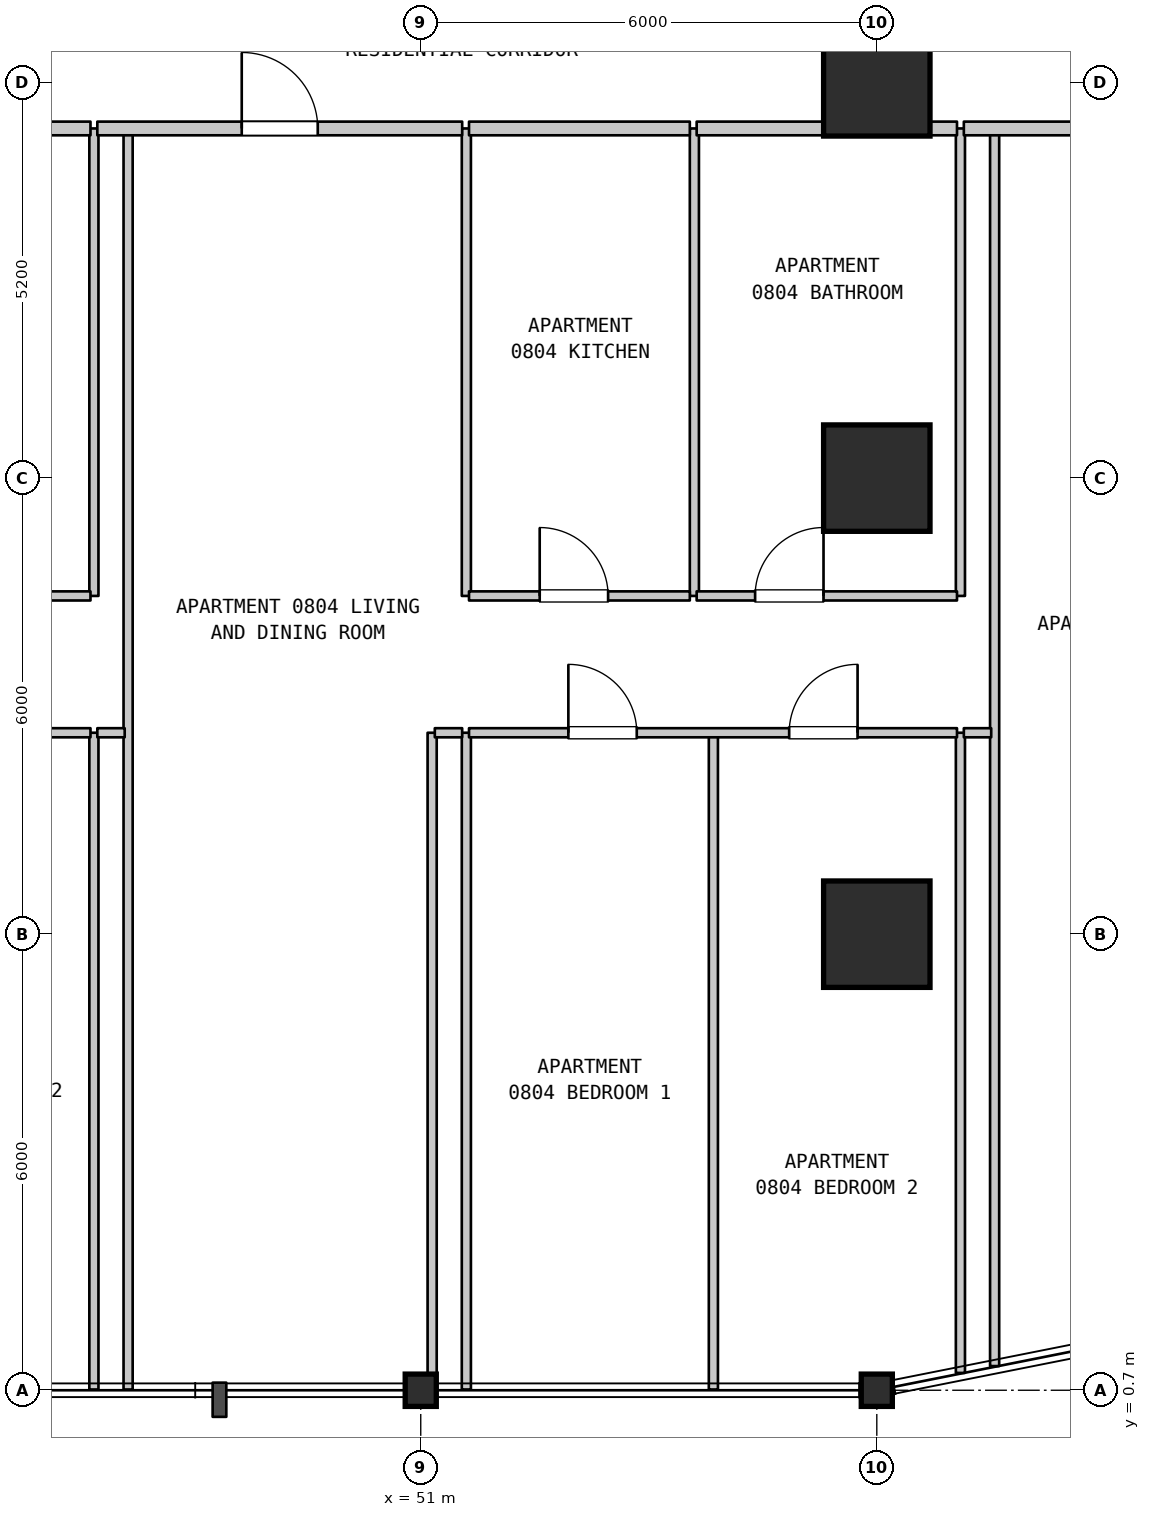
"""IFC4 building model, lengths in metres.
Left out: names, types, materials, properties, quantities, classifications, styles, units other than length and angle.
Written with IfcOpenShell. Run it as: python <this file> out.ifc"""

import sys

from ifc_helpers import new_model, si_unit, direction, frame, frame_2d, origin, origin_2d, place, context, subcontext, project, spatial, rectangle, i_section, extrude, element, fill, save


model = new_model("IFC4")
c1 = context("Model", 3, precision=1e-05, world=origin(), true_north=direction((0.0, 1.0)))
c2 = subcontext(c1, "Body", "Model", "MODEL_VIEW")
j1 = project(units=[si_unit("LENGTHUNIT", "METRE"), si_unit("PLANEANGLEUNIT", "RADIAN")], contexts=[c1])
p1 = place(None, origin())
s1 = spatial("IfcSite", under=j1, at=p1, CompositionType="ELEMENT")
p2 = place(p1, origin())
s2 = spatial("IfcBuilding", under=s1, at=p2, CompositionType="ELEMENT")
p3 = place(p2, frame((0.0, 0.0, 38.8)))
s3 = spatial("IfcBuildingStorey", under=s2, at=p3, CompositionType="ELEMENT", Elevation=38.8)
for number, where, z_axis, x_axis in (
    (1, (51.0, 0.7, 0.0), (0.0, 0.0, 1.0), (1.0, 0.0, 0.0)),
    (2, (57.0, 0.7, 0.0), (0.0, 0.0, 1.0), (1.0, 0.0, 0.0)),
):
    element("IfcColumn", number, at=place(p3, frame(where, z_axis=z_axis, x_axis=x_axis)), inside=s3, PredefinedType="COLUMN", context=c2, shape_type="SweptSolid", body=[
        extrude(i_section(OverallWidth=0.409, OverallDepth=0.425, WebThickness=0.032, FlangeThickness=0.052, FilletRadius=0.015, at=origin_2d()), origin(), (0.0, 0.0, 1.0), 3.7),
    ])
for number, where, z_axis, x_axis in (
    (3, (57.0, 6.7, 0.0), (0.0, 0.0, 1.0), (1.0, 0.0, 0.0)),
    (4, (57.0, 12.7, 0.0), (0.0, 0.0, 1.0), (1.0, 0.0, 0.0)),
    (5, (57.0, 17.9, 0.0), (0.0, 0.0, 1.0), (1.0, 0.0, 0.0)),
):
    element("IfcColumn", number, at=place(p3, frame(where, z_axis=z_axis, x_axis=x_axis)), inside=s3, PredefinedType="COLUMN", context=c2, shape_type="SweptSolid", body=[
        extrude(rectangle(XDim=1.4, YDim=1.4, at=origin_2d()), origin(), (0.0, 0.0, 1.0), 3.7),
    ])
p4 = place(p3, frame((46.7, 0.71, 0.0), z_axis=(0.0, 0.0, 1.0), x_axis=(0.0, 1.0, 0.0)))
e6 = element("IfcWall", 6, at=p4, inside=s3, PredefinedType="PARTITIONING", context=c2, shape_type="SweptSolid", body=[
    extrude(rectangle(XDim=8.64, YDim=0.12, at=frame_2d((4.32, 0.0))), origin(), (0.0, 0.0, 1.0), 3.385),
])
p5 = place(p3, frame((46.7, 11.15, 0.0), z_axis=(0.0, 0.0, 1.0), x_axis=(0.0, 1.0, 0.0)))
e7 = element("IfcWall", 7, at=p5, inside=s3, PredefinedType="PARTITIONING", context=c2, shape_type="SweptSolid", body=[
    extrude(rectangle(XDim=6.15, YDim=0.12, at=frame_2d((3.075, 0.0))), origin(), (0.0, 0.0, 1.0), 3.385),
])
p6 = place(p3, frame((47.15, 0.71, 0.0), z_axis=(0.0, 0.0, 1.0), x_axis=(0.0, 1.0, 0.0)))
e8 = element("IfcWall", 8, at=p6, inside=s3, PredefinedType="PARTITIONING", context=c2, shape_type="SweptSolid", body=[
    extrude(rectangle(XDim=16.59, YDim=0.12, at=frame_2d((8.295, 0.0))), origin(), (0.0, 0.0, 1.0), 3.385),
])
for number, where, z_axis, x_axis in (
    (9, (51.15, 0.71, 0.0), (0.0, 0.0, 1.0), (0.0, 1.0, 0.0)),
    (10, (51.6, 0.71, 0.0), (0.0, 0.0, 1.0), (0.0, 1.0, 0.0)),
):
    element("IfcWall", number, at=place(p3, frame(where, z_axis=z_axis, x_axis=x_axis)), inside=s3, PredefinedType="PARTITIONING", context=c2, shape_type="SweptSolid", body=[
        extrude(rectangle(XDim=8.64, YDim=0.12, at=frame_2d((4.32, 0.0))), origin(), (0.0, 0.0, 1.0), 3.385),
    ])
for number, where, z_axis, x_axis in (
    (11, (51.6, 11.15, 0.0), (0.0, 0.0, 1.0), (0.0, 1.0, 0.0)),
    (12, (54.6, 11.15, 0.0), (0.0, 0.0, 1.0), (0.0, 1.0, 0.0)),
):
    element("IfcWall", number, at=place(p3, frame(where, z_axis=z_axis, x_axis=x_axis)), inside=s3, PredefinedType="PARTITIONING", context=c2, shape_type="SweptSolid", body=[
        extrude(rectangle(XDim=6.15, YDim=0.12, at=frame_2d((3.075, 0.0))), origin(), (0.0, 0.0, 1.0), 3.385),
    ])
p7 = place(p3, frame((54.85, 0.71, 0.0), z_axis=(0.0, 0.0, 1.0), x_axis=(0.0, 1.0, 0.0)))
e13 = element("IfcWall", 13, at=p7, inside=s3, PredefinedType="PARTITIONING", context=c2, shape_type="SweptSolid", body=[
    extrude(rectangle(XDim=8.64, YDim=0.12, at=frame_2d((4.32, 0.0))), origin(), (0.0, 0.0, 1.0), 3.385),
])
p8 = place(p3, frame((58.1, 0.928, 0.0), z_axis=(0.0, 0.0, 1.0), x_axis=(0.0, 1.0, 0.0)))
e14 = element("IfcWall", 14, at=p8, inside=s3, PredefinedType="PARTITIONING", context=c2, shape_type="SweptSolid", body=[
    extrude(rectangle(XDim=8.422, YDim=0.12, at=frame_2d((4.211, 0.0))), origin(), (0.0, 0.0, 1.0), 3.385),
])
p9 = place(p3, frame((58.1, 11.15, 0.0), z_axis=(0.0, 0.0, 1.0), x_axis=(0.0, 1.0, 0.0)))
e15 = element("IfcWall", 15, at=p9, inside=s3, PredefinedType="PARTITIONING", context=c2, shape_type="SweptSolid", body=[
    extrude(rectangle(XDim=6.15, YDim=0.12, at=frame_2d((3.075, 0.0))), origin(), (0.0, 0.0, 1.0), 3.385),
])
p10 = place(p3, frame((58.55, 1.018, 0.0), z_axis=(0.0, 0.0, 1.0), x_axis=(0.0, 1.0, 0.0)))
e16 = element("IfcWall", 16, at=p10, inside=s3, PredefinedType="PARTITIONING", context=c2, shape_type="SweptSolid", body=[
    extrude(rectangle(XDim=16.282, YDim=0.12, at=frame_2d((8.141, 0.0))), origin(), (0.0, 0.0, 1.0), 3.385),
])
p11 = place(p3, frame((40.805, 9.35, 0.0), z_axis=(0.0, 0.0, 1.0), x_axis=(1.0, 0.0, 0.0)))
e17 = element("IfcWall", 17, at=p11, inside=s3, PredefinedType="PARTITIONING", context=c2, shape_type="SweptSolid", body=[
    extrude(rectangle(XDim=5.85, YDim=0.12, at=frame_2d((2.925, 0.0))), origin(), (0.0, 0.0, 1.0), 3.385),
])
p12 = place(p11, frame((1.165, 0.0, 0.0)))
e18 = element("IfcOpeningElement", 18, at=p12, cuts=e17, PredefinedType="OPENING", context=c2, shape_type="SweptSolid", body=[
    extrude(rectangle(XDim=0.9, YDim=2.15, at=frame_2d((0.45, 1.075))), frame((0.0, 0.07, 0.0), z_axis=(0.0, -1.0, 0.0), x_axis=(1.0, 0.0, 0.0)), (0.0, 0.0, 1.0), 0.14),
])
p13 = place(p11, frame((3.785, 0.0, 0.0)))
e19 = element("IfcOpeningElement", 19, at=p13, cuts=e17, PredefinedType="OPENING", context=c2, shape_type="SweptSolid", body=[
    extrude(rectangle(XDim=0.9, YDim=2.15, at=frame_2d((0.45, 1.075))), frame((0.0, 0.07, 0.0), z_axis=(0.0, -1.0, 0.0), x_axis=(1.0, 0.0, 0.0)), (0.0, 0.0, 1.0), 0.14),
])
for number, where, z_axis, x_axis in (
    (20, (46.745, 9.35, 0.0), (0.0, 0.0, 1.0), (1.0, 0.0, 0.0)),
    (21, (51.185, 9.35, 0.0), (0.0, 0.0, 1.0), (1.0, 0.0, 0.0)),
):
    element("IfcWall", number, at=place(p3, frame(where, z_axis=z_axis, x_axis=x_axis)), inside=s3, PredefinedType="PARTITIONING", context=c2, shape_type="SweptSolid", body=[
        extrude(rectangle(XDim=0.36, YDim=0.12, at=frame_2d((0.18, 0.0))), origin(), (0.0, 0.0, 1.0), 3.385),
    ])
p14 = place(p3, frame((51.635, 9.35, 0.0), z_axis=(0.0, 0.0, 1.0), x_axis=(1.0, 0.0, 0.0)))
e22 = element("IfcWall", 22, at=p14, inside=s3, PredefinedType="PARTITIONING", context=c2, shape_type="SweptSolid", body=[
    extrude(rectangle(XDim=6.42, YDim=0.12, at=frame_2d((3.21, 0.0))), origin(), (0.0, 0.0, 1.0), 3.385),
])
p15 = place(p14, frame((1.307, 0.0, 0.0)))
e23 = element("IfcOpeningElement", 23, at=p15, cuts=e22, PredefinedType="OPENING", context=c2, shape_type="SweptSolid", body=[
    extrude(rectangle(XDim=0.9, YDim=2.15, at=frame_2d((0.45, 1.075))), frame((0.0, 0.07, 0.0), z_axis=(0.0, -1.0, 0.0), x_axis=(1.0, 0.0, 0.0)), (0.0, 0.0, 1.0), 0.14),
])
p16 = place(p14, frame((4.212, 0.0, 0.0)))
e24 = element("IfcOpeningElement", 24, at=p16, cuts=e22, PredefinedType="OPENING", context=c2, shape_type="SweptSolid", body=[
    extrude(rectangle(XDim=0.9, YDim=2.15, at=frame_2d((0.45, 1.075))), frame((0.0, 0.07, 0.0), z_axis=(0.0, -1.0, 0.0), x_axis=(1.0, 0.0, 0.0)), (0.0, 0.0, 1.0), 0.14),
])
p17 = place(p3, frame((58.145, 9.35, 0.0), z_axis=(0.0, 0.0, 1.0), x_axis=(1.0, 0.0, 0.0)))
e25 = element("IfcWall", 25, at=p17, inside=s3, PredefinedType="PARTITIONING", context=c2, shape_type="SweptSolid", body=[
    extrude(rectangle(XDim=0.36, YDim=0.12, at=frame_2d((0.18, 0.0))), origin(), (0.0, 0.0, 1.0), 3.385),
])
p18 = place(p3, frame((43.537, 11.15, 0.0), z_axis=(0.0, 0.0, 1.0), x_axis=(1.0, 0.0, 0.0)))
e26 = element("IfcWall", 26, at=p18, inside=s3, PredefinedType="PARTITIONING", context=c2, shape_type="SweptSolid", body=[
    extrude(rectangle(XDim=3.118, YDim=0.12, at=frame_2d((1.559, 0.0))), origin(), (0.0, 0.0, 1.0), 3.385),
])
p19 = place(p18, frame((1.109, 0.0, 0.0)))
e27 = element("IfcOpeningElement", 27, at=p19, cuts=e26, PredefinedType="OPENING", context=c2, shape_type="SweptSolid", body=[
    extrude(rectangle(XDim=0.9, YDim=2.1, at=frame_2d((0.45, 1.05))), frame((0.0, 0.07, 0.0), z_axis=(0.0, -1.0, 0.0), x_axis=(1.0, 0.0, 0.0)), (0.0, 0.0, 1.0), 0.14),
])
p20 = place(p3, frame((51.635, 11.15, 0.0), z_axis=(0.0, 0.0, 1.0), x_axis=(1.0, 0.0, 0.0)))
e28 = element("IfcWall", 28, at=p20, inside=s3, PredefinedType="PARTITIONING", context=c2, shape_type="SweptSolid", body=[
    extrude(rectangle(XDim=2.905, YDim=0.12, at=frame_2d((1.453, 0.0))), origin(), (0.0, 0.0, 1.0), 3.385),
])
p21 = place(p20, frame((0.93, 0.0, 0.0)))
e29 = element("IfcOpeningElement", 29, at=p21, cuts=e28, PredefinedType="OPENING", context=c2, shape_type="SweptSolid", body=[
    extrude(rectangle(XDim=0.9, YDim=2.15, at=frame_2d((0.45, 1.075))), frame((0.0, 0.07, 0.0), z_axis=(0.0, -1.0, 0.0), x_axis=(1.0, 0.0, 0.0)), (0.0, 0.0, 1.0), 0.14),
])
p22 = place(p3, frame((54.63, 11.15, 0.0), z_axis=(0.0, 0.0, 1.0), x_axis=(1.0, 0.0, 0.0)))
e30 = element("IfcWall", 30, at=p22, inside=s3, PredefinedType="PARTITIONING", context=c2, shape_type="SweptSolid", body=[
    extrude(rectangle(XDim=3.425, YDim=0.12, at=frame_2d((1.712, 0.0))), origin(), (0.0, 0.0, 1.0), 3.385),
])
p23 = place(p22, frame((0.769, 0.0, 0.0)))
e31 = element("IfcOpeningElement", 31, at=p23, cuts=e30, PredefinedType="OPENING", context=c2, shape_type="SweptSolid", body=[
    extrude(rectangle(XDim=0.9, YDim=2.1, at=frame_2d((0.45, 1.05))), frame((0.0, 0.07, 0.0), z_axis=(0.0, -1.0, 0.0), x_axis=(1.0, 0.0, 0.0)), (0.0, 0.0, 1.0), 0.14),
])
p24 = place(p3, frame((43.537, 17.3, 0.0), z_axis=(0.0, 0.0, 1.0), x_axis=(1.0, 0.0, 0.0)))
e32 = element("IfcWall", 32, at=p24, inside=s3, PredefinedType="STANDARD", context=c2, shape_type="SweptSolid", body=[
    extrude(rectangle(XDim=3.118, YDim=0.18, at=frame_2d((1.559, 0.0))), origin(), (0.0, 0.0, 1.0), 3.385),
])
p25 = place(p3, frame((46.745, 17.3, 0.0), z_axis=(0.0, 0.0, 1.0), x_axis=(1.0, 0.0, 0.0)))
e33 = element("IfcWall", 33, at=p25, inside=s3, PredefinedType="STANDARD", context=c2, shape_type="SweptSolid", body=[
    extrude(rectangle(XDim=4.8, YDim=0.18, at=frame_2d((2.4, 0.0))), origin(), (0.0, 0.0, 1.0), 3.385),
])
p26 = place(p25, frame((1.9, 0.0, 0.0)))
e34 = element("IfcOpeningElement", 34, at=p26, cuts=e33, PredefinedType="OPENING", context=c2, shape_type="SweptSolid", body=[
    extrude(rectangle(XDim=1.0, YDim=2.15, at=frame_2d((0.5, 1.075))), frame((0.0, 0.1, 0.0), z_axis=(0.0, -1.0, 0.0), x_axis=(1.0, 0.0, 0.0)), (0.0, 0.0, 1.0), 0.2),
])
p27 = place(p3, frame((51.635, 17.3, 0.0), z_axis=(0.0, 0.0, 1.0), x_axis=(1.0, 0.0, 0.0)))
e35 = element("IfcWall", 35, at=p27, inside=s3, PredefinedType="STANDARD", context=c2, shape_type="SweptSolid", body=[
    extrude(rectangle(XDim=2.905, YDim=0.18, at=frame_2d((1.453, 0.0))), origin(), (0.0, 0.0, 1.0), 3.385),
])
p28 = place(p3, frame((54.63, 17.3, 0.0), z_axis=(0.0, 0.0, 1.0), x_axis=(1.0, 0.0, 0.0)))
e36 = element("IfcWall", 36, at=p28, inside=s3, PredefinedType="STANDARD", context=c2, shape_type="SweptSolid", body=[
    extrude(rectangle(XDim=3.425, YDim=0.18, at=frame_2d((1.712, 0.0))), origin(), (0.0, 0.0, 1.0), 3.385),
])
p29 = place(p3, frame((58.145, 17.3, 0.0), z_axis=(0.0, 0.0, 1.0), x_axis=(1.0, 0.0, 0.0)))
e37 = element("IfcWall", 37, at=p29, inside=s3, PredefinedType="STANDARD", context=c2, shape_type="SweptSolid", body=[
    extrude(rectangle(XDim=4.76, YDim=0.18, at=frame_2d((2.38, 0.0))), origin(), (0.0, 0.0, 1.0), 3.385),
])
p30 = place(p29, frame((2.01, 0.0, 0.0)))
e38 = element("IfcOpeningElement", 38, at=p30, cuts=e37, PredefinedType="OPENING", context=c2, shape_type="SweptSolid", body=[
    extrude(rectangle(XDim=1.0, YDim=2.15, at=frame_2d((0.5, 1.075))), frame((0.0, 0.1, 0.0), z_axis=(0.0, -1.0, 0.0), x_axis=(1.0, 0.0, 0.0)), (0.0, 0.0, 1.0), 0.2),
])
p31 = place(p15, origin())
e39 = element("IfcDoor", 39, at=p31, inside=s3, OperationType="SINGLE_SWING_LEFT", PredefinedType="DOOR", context=c2, shape_type="SweptSolid", body=[
    extrude(rectangle(XDim=0.9, YDim=2.15, at=frame_2d((0.45, 1.075))), frame((0.0, 0.025, 0.0), z_axis=(0.0, -1.0, 0.0), x_axis=(1.0, 0.0, 0.0)), (0.0, 0.0, 1.0), 0.05),
])
fill(e23, e39)
p32 = place(p16, origin())
e40 = element("IfcDoor", 40, at=p32, inside=s3, OperationType="SINGLE_SWING_RIGHT", PredefinedType="DOOR", context=c2, shape_type="SweptSolid", body=[
    extrude(rectangle(XDim=0.9, YDim=2.15, at=frame_2d((0.45, 1.075))), frame((0.0, 0.025, 0.0), z_axis=(0.0, -1.0, 0.0), x_axis=(1.0, 0.0, 0.0)), (0.0, 0.0, 1.0), 0.05),
])
fill(e24, e40)
p33 = place(p21, origin())
e41 = element("IfcDoor", 41, at=p33, inside=s3, OperationType="SINGLE_SWING_LEFT", PredefinedType="DOOR", context=c2, shape_type="SweptSolid", body=[
    extrude(rectangle(XDim=0.9, YDim=2.15, at=frame_2d((0.45, 1.075))), frame((0.0, 0.025, 0.0), z_axis=(0.0, -1.0, 0.0), x_axis=(1.0, 0.0, 0.0)), (0.0, 0.0, 1.0), 0.05),
])
fill(e29, e41)
p34 = place(p23, origin())
e42 = element("IfcDoor", 42, at=p34, inside=s3, OperationType="SINGLE_SWING_RIGHT", PredefinedType="DOOR", context=c2, shape_type="SweptSolid", body=[
    extrude(rectangle(XDim=0.9, YDim=2.1, at=frame_2d((0.45, 1.05))), frame((0.0, 0.025, 0.0), z_axis=(0.0, -1.0, 0.0), x_axis=(1.0, 0.0, 0.0)), (0.0, 0.0, 1.0), 0.05),
])
fill(e31, e42)
p35 = place(p26, origin())
e43 = element("IfcDoor", 43, at=p35, inside=s3, OperationType="SINGLE_SWING_LEFT", PredefinedType="DOOR", context=c2, shape_type="SweptSolid", body=[
    extrude(rectangle(XDim=1.0, YDim=2.15, at=frame_2d((0.5, 1.075))), frame((0.0, 0.025, 0.0), z_axis=(0.0, -1.0, 0.0), x_axis=(1.0, 0.0, 0.0)), (0.0, 0.0, 1.0), 0.05),
])
fill(e34, e43)
save(model, sys.argv[1])
